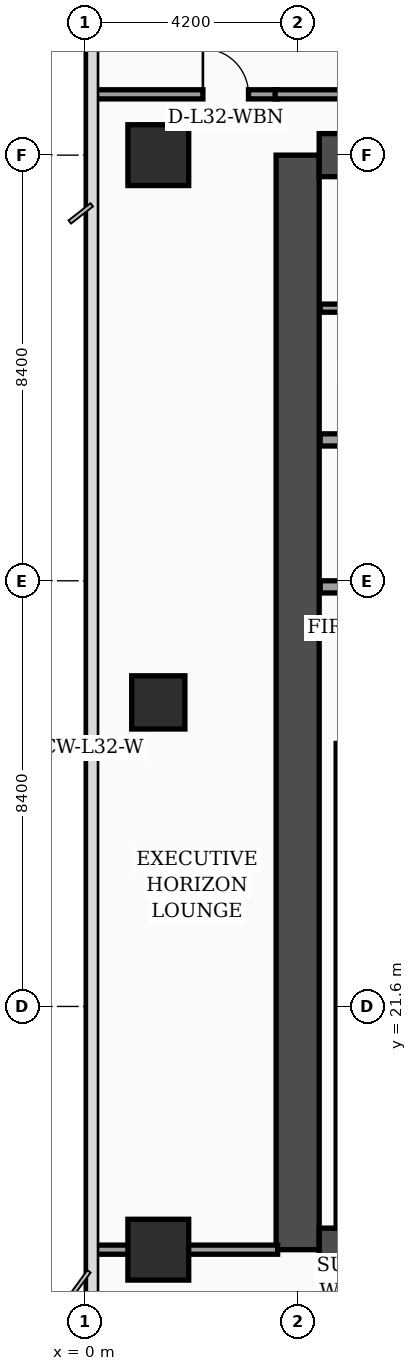
"""IFC4 building model, lengths in metres.
Left out: names, types, materials, properties, quantities, classifications, styles, units other than length and angle.
Written with IfcOpenShell. Run it as: python <this file> out.ifc"""

import sys

from ifc_helpers import new_model, si_unit, direction, frame, frame_2d, origin, origin_2d, place, context, subcontext, project, spatial, rectangle, extrude, element, fill, save


model = new_model("IFC4")
c1 = context("Model", 3, precision=1e-05, world=origin(), true_north=direction((0.0, 1.0)))
c2 = subcontext(c1, "Body", "Model", "MODEL_VIEW")
j1 = project(units=[si_unit("LENGTHUNIT", "METRE"), si_unit("PLANEANGLEUNIT", "RADIAN")], contexts=[c1])
p1 = place(None, origin())
s1 = spatial("IfcSite", under=j1, at=p1, CompositionType="ELEMENT")
p2 = place(p1, origin())
s2 = spatial("IfcBuilding", under=s1, at=p2, CompositionType="ELEMENT")
p3 = place(p2, frame((0.0, 0.0, 131.6)))
s3 = spatial("IfcBuildingStorey", under=s2, at=p3, CompositionType="ELEMENT", Elevation=131.6)
p4 = place(p3, frame((4.2, 16.8, 0.0), z_axis=(0.0, 0.0, 1.0), x_axis=(0.0, 1.0, 0.0)))
e1 = element("IfcWall", 1, at=p4, inside=s3, PredefinedType="SHEAR", context=c2, shape_type="SweptSolid", body=[
    extrude(rectangle(XDim=21.6, YDim=0.85, at=frame_2d((10.8, 0.0))), origin(), (0.0, 0.0, 1.0), 3.56),
])
for number, where, z_axis, x_axis in (
    (2, (4.625, 38.4, 0.0), (0.0, 0.0, 1.0), (1.0, 0.0, 0.0)),
    (3, (4.625, 16.8, 0.0), (0.0, 0.0, 1.0), (1.0, 0.0, 0.0)),
):
    element("IfcWall", number, at=place(p3, frame(where, z_axis=z_axis, x_axis=x_axis)), inside=s3, PredefinedType="SHEAR", context=c2, shape_type="SweptSolid", body=[
        extrude(rectangle(XDim=9.95, YDim=0.85, at=frame_2d((4.975, 0.0))), origin(), (0.0, 0.0, 1.0), 3.56),
    ])
p5 = place(p3, frame((5.08, 17.225, 0.0), z_axis=(0.0, 0.0, 1.0), x_axis=(0.0, 1.0, 0.0)))
e4 = element("IfcWall", 4, at=p5, inside=s3, PredefinedType="SOLIDWALL", context=c2, shape_type="SweptSolid", body=[
    extrude(rectangle(XDim=9.565, YDim=0.24, at=frame_2d((4.782, 0.0))), origin(), (0.0, 0.0, 1.0), 3.56),
])
p6 = place(p3, frame((1.45, 16.8, 0.0), z_axis=(0.0, 0.0, 1.0), x_axis=(1.0, 0.0, 0.0)))
e5 = element("IfcColumn", 5, at=p6, inside=s3, PredefinedType="COLUMN", context=c2, shape_type="SweptSolid", body=[
    extrude(rectangle(XDim=1.2, YDim=1.2, at=origin_2d()), origin(), (0.0, 0.0, 1.0), 3.56),
])
p7 = place(p3, frame((1.45, 27.6, 0.0), z_axis=(0.0, 0.0, 1.0), x_axis=(1.0, 0.0, 0.0)))
e6 = element("IfcColumn", 6, at=p7, inside=s3, PredefinedType="COLUMN", context=c2, shape_type="SweptSolid", body=[
    extrude(rectangle(XDim=1.05, YDim=1.05, at=origin_2d()), origin(), (0.0, 0.0, 1.0), 3.56),
])
p8 = place(p3, frame((1.45, 38.4, 0.0), z_axis=(0.0, 0.0, 1.0), x_axis=(1.0, 0.0, 0.0)))
e7 = element("IfcColumn", 7, at=p8, inside=s3, PredefinedType="COLUMN", context=c2, shape_type="SweptSolid", body=[
    extrude(rectangle(XDim=1.2, YDim=1.2, at=origin_2d()), origin(), (0.0, 0.0, 1.0), 3.56),
])
p9 = place(p3, frame((4.645, 29.88, 0.0), z_axis=(0.0, 0.0, 1.0), x_axis=(1.0, 0.0, 0.0)))
e8 = element("IfcWall", 8, at=p9, inside=s3, PredefinedType="SOLIDWALL", context=c2, shape_type="SweptSolid", body=[
    extrude(rectangle(XDim=4.775, YDim=0.24, at=frame_2d((2.387, 0.0))), origin(), (0.0, 0.0, 1.0), 3.56),
])
p10 = place(p9, frame((0.45, 0.0, 0.0)))
e9 = element("IfcOpeningElement", 9, at=p10, cuts=e8, PredefinedType="OPENING", context=c2, shape_type="SweptSolid", body=[
    extrude(rectangle(XDim=1.3, YDim=2.35, at=frame_2d((0.65, 1.175))), frame((0.0, 0.13, 0.0), z_axis=(0.0, -1.0, 0.0), x_axis=(1.0, 0.0, 0.0)), (0.0, 0.0, 1.0), 0.26),
])
p11 = place(p3, frame((4.645, 32.78, 0.0), z_axis=(0.0, 0.0, 1.0), x_axis=(1.0, 0.0, 0.0)))
e10 = element("IfcWall", 10, at=p11, inside=s3, PredefinedType="SOLIDWALL", context=c2, shape_type="SweptSolid", body=[
    extrude(rectangle(XDim=4.775, YDim=0.24, at=frame_2d((2.387, 0.0))), origin(), (0.0, 0.0, 1.0), 3.19),
])
p12 = place(p3, frame((4.645, 35.38, 0.0), z_axis=(0.0, 0.0, 1.0), x_axis=(1.0, 0.0, 0.0)))
e11 = element("IfcWall", 11, at=p12, inside=s3, PredefinedType="PARTITIONING", context=c2, shape_type="SweptSolid", body=[
    extrude(rectangle(XDim=4.775, YDim=0.16, at=frame_2d((2.387, 0.0))), origin(), (0.0, 0.0, 1.0), 3.56),
])
p13 = place(p12, frame((1.3, 0.0, 0.0)))
e12 = element("IfcOpeningElement", 12, at=p13, cuts=e11, PredefinedType="OPENING", context=c2, shape_type="SweptSolid", body=[
    extrude(rectangle(XDim=0.98, YDim=2.15, at=frame_2d((0.49, 1.075))), frame((0.0, 0.09, 0.0), z_axis=(0.0, -1.0, 0.0), x_axis=(1.0, 0.0, 0.0)), (0.0, 0.0, 1.0), 0.18),
])
p14 = place(p3, frame((0.08, 16.8, 0.0), z_axis=(0.0, 0.0, 1.0), x_axis=(1.0, 0.0, 0.0)))
e13 = element("IfcWall", 13, at=p14, inside=s3, PredefinedType="PARTITIONING", context=c2, shape_type="SweptSolid", body=[
    extrude(rectangle(XDim=3.725, YDim=0.18, at=frame_2d((1.862, 0.0))), origin(), (0.0, 0.0, 1.0), 2.84),
])
p15 = place(p3, frame((0.08, 39.6, 0.0), z_axis=(0.0, 0.0, 1.0), x_axis=(1.0, 0.0, 0.0)))
e14 = element("IfcWall", 14, at=p15, inside=s3, PredefinedType="PARTITIONING", context=c2, shape_type="SweptSolid", body=[
    extrude(rectangle(XDim=3.725, YDim=0.18, at=frame_2d((1.862, 0.0))), origin(), (0.0, 0.0, 1.0), 2.84),
])
p16 = place(p15, frame((2.25, 0.0, 0.0)))
e15 = element("IfcOpeningElement", 15, at=p16, cuts=e14, PredefinedType="OPENING", context=c2, shape_type="SweptSolid", body=[
    extrude(rectangle(XDim=0.9, YDim=2.15, at=frame_2d((0.45, 1.075))), frame((0.0, 0.1, 0.0), z_axis=(0.0, -1.0, 0.0), x_axis=(1.0, 0.0, 0.0)), (0.0, 0.0, 1.0), 0.2),
])
p17 = place(p3, frame((3.755, 39.6, 0.0), z_axis=(0.0, 0.0, 1.0), x_axis=(1.0, 0.0, 0.0)))
e16 = element("IfcWall", 16, at=p17, inside=s3, PredefinedType="PARTITIONING", context=c2, shape_type="SweptSolid", body=[
    extrude(rectangle(XDim=11.395, YDim=0.18, at=frame_2d((5.698, 0.0))), origin(), (0.0, 0.0, 1.0), 2.84),
])
p18 = place(p16, origin())
e17 = element("IfcDoor", 17, at=p18, inside=s3, OperationType="SINGLE_SWING_LEFT", PredefinedType="DOOR", context=c2, shape_type="SweptSolid", body=[
    extrude(rectangle(XDim=0.9, YDim=2.15, at=frame_2d((0.45, 1.075))), frame((0.0, 0.025, 0.0), z_axis=(0.0, -1.0, 0.0), x_axis=(1.0, 0.0, 0.0)), (0.0, 0.0, 1.0), 0.05),
])
fill(e15, e17)
save(model, sys.argv[1])
